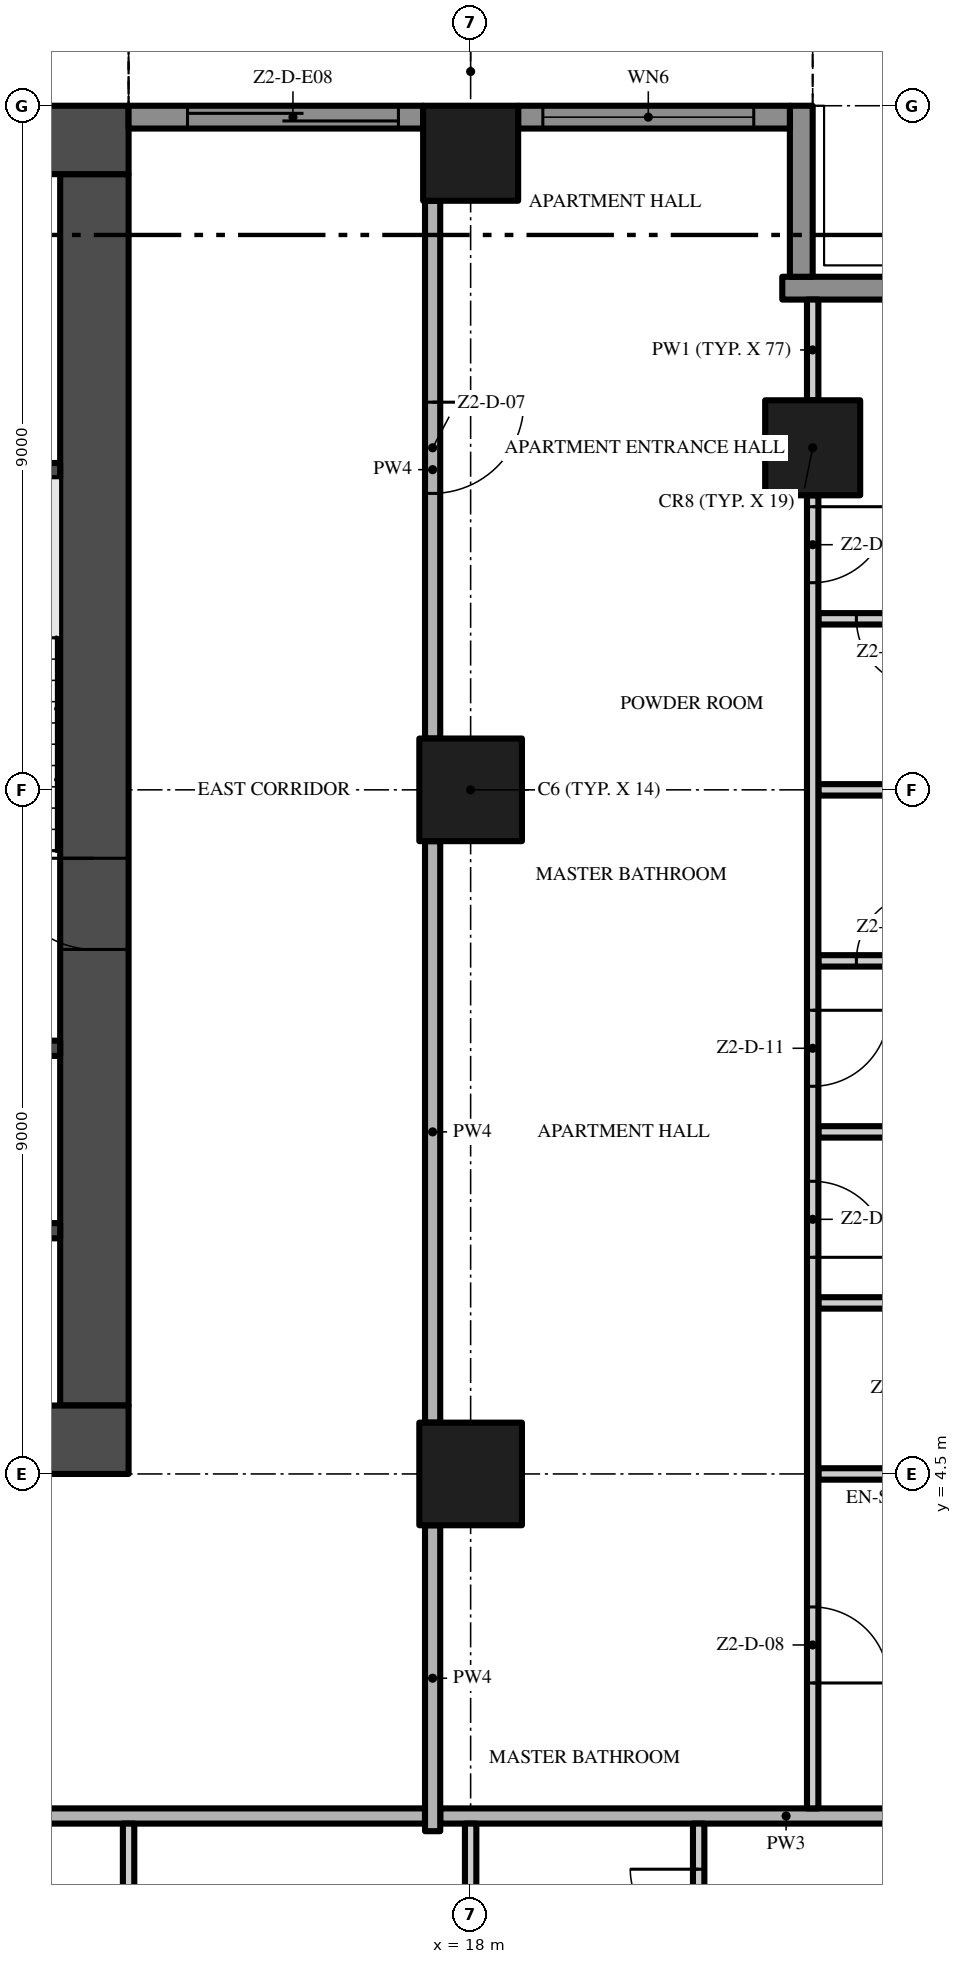
"""IFC4 building model, lengths in metres.
Left out: names, types, materials, properties, quantities, classifications, styles, units other than length and angle.
Written with IfcOpenShell. Run it as: python <this file> out.ifc"""

import sys

from ifc_helpers import new_model, si_unit, direction, frame, frame_2d, origin, origin_2d, place, context, subcontext, project, spatial, rectangle, extrude, element, fill, save


model = new_model("IFC4")
c1 = context("Model", 3, precision=1e-05, world=origin(), true_north=direction((0.0, 1.0)))
c2 = subcontext(c1, "Body", "Model", "MODEL_VIEW")
j1 = project(units=[si_unit("LENGTHUNIT", "METRE"), si_unit("PLANEANGLEUNIT", "RADIAN")], contexts=[c1])
p1 = place(None, origin())
s1 = spatial("IfcSite", under=j1, at=p1, CompositionType="ELEMENT")
p2 = place(p1, origin())
s2 = spatial("IfcBuilding", under=s1, at=p2, CompositionType="ELEMENT")
p3 = place(p2, frame((0.0, 0.0, 103.6)))
s3 = spatial("IfcBuildingStorey", under=s2, at=p3, CompositionType="ELEMENT", Elevation=103.6)
p4 = place(p3, frame((-13.5, 4.95, -0.3), z_axis=(0.0, 0.0, 1.0), x_axis=(1.0, 0.0, 0.0)))
e1 = element("IfcWall", 1, at=p4, inside=s3, PredefinedType="SHEAR", context=c2, shape_type="SweptSolid", body=[
    extrude(rectangle(XDim=27.0, YDim=0.9, at=frame_2d((13.5, 0.0))), origin(), (0.0, 0.0, 1.0), 3.8),
])
p5 = place(p4, frame((12.0, 0.0, 0.3)))
e2 = element("IfcOpeningElement", 2, at=p5, cuts=e1, PredefinedType="OPENING", context=c2, shape_type="SweptSolid", body=[
    extrude(rectangle(XDim=3.0, YDim=2.4, at=frame_2d((1.5, 1.2))), frame((0.0, 0.46, 0.0), z_axis=(0.0, -1.0, 0.0), x_axis=(1.0, 0.0, 0.0)), (0.0, 0.0, 1.0), 0.92),
])
p6 = place(p4, frame((4.9, 0.0, 0.3)))
e3 = element("IfcOpeningElement", 3, at=p6, cuts=e1, PredefinedType="OPENING", context=c2, shape_type="SweptSolid", body=[
    extrude(rectangle(XDim=1.2, YDim=2.2, at=frame_2d((0.6, 1.1))), frame((0.0, 0.46, 0.0), z_axis=(0.0, -1.0, 0.0), x_axis=(1.0, 0.0, 0.0)), (0.0, 0.0, 1.0), 0.92),
])
p7 = place(p4, frame((20.75, 0.0, 0.3)))
e4 = element("IfcOpeningElement", 4, at=p7, cuts=e1, PredefinedType="OPENING", context=c2, shape_type="SweptSolid", body=[
    extrude(rectangle(XDim=1.5, YDim=2.2, at=frame_2d((0.75, 1.1))), frame((0.0, 0.46, 0.0), z_axis=(0.0, -1.0, 0.0), x_axis=(1.0, 0.0, 0.0)), (0.0, 0.0, 1.0), 0.92),
])
p8 = place(p4, frame((17.4, 0.0, 0.3)))
e5 = element("IfcOpeningElement", 5, at=p8, cuts=e1, PredefinedType="OPENING", context=c2, shape_type="SweptSolid", body=[
    extrude(rectangle(XDim=1.2, YDim=2.2, at=frame_2d((0.6, 1.1))), frame((0.0, 0.46, 0.0), z_axis=(0.0, -1.0, 0.0), x_axis=(1.0, 0.0, 0.0)), (0.0, 0.0, 1.0), 0.92),
])
p9 = place(p3, frame((13.05, 5.4, -0.3), z_axis=(0.0, 0.0, 1.0), x_axis=(0.0, 1.0, 0.0)))
e6 = element("IfcWall", 6, at=p9, inside=s3, PredefinedType="SHEAR", context=c2, shape_type="SweptSolid", body=[
    extrude(rectangle(XDim=16.2, YDim=0.9, at=frame_2d((8.1, 0.0))), origin(), (0.0, 0.0, 1.0), 3.8),
])
p10 = place(p9, frame((6.0, 0.0, 0.3)))
e7 = element("IfcOpeningElement", 7, at=p10, cuts=e6, PredefinedType="OPENING", context=c2, shape_type="SweptSolid", body=[
    extrude(rectangle(XDim=1.2, YDim=2.2, at=frame_2d((0.6, 1.1))), frame((0.0, 0.46, 0.0), z_axis=(0.0, -1.0, 0.0), x_axis=(1.0, 0.0, 0.0)), (0.0, 0.0, 1.0), 0.92),
])
p11 = place(p3, frame((13.5, 22.05, -0.3), z_axis=(0.0, 0.0, 1.0), x_axis=(-1.0, 0.0, 0.0)))
e8 = element("IfcWall", 8, at=p11, inside=s3, PredefinedType="SHEAR", context=c2, shape_type="SweptSolid", body=[
    extrude(rectangle(XDim=27.0, YDim=0.9, at=frame_2d((13.5, 0.0))), origin(), (0.0, 0.0, 1.0), 3.8),
])
p12 = place(p3, frame((18.0, 13.5, 0.0), z_axis=(0.0, 0.0, 1.0), x_axis=(1.0, 0.0, 0.0)))
e9 = element("IfcColumn", 9, at=p12, inside=s3, PredefinedType="COLUMN", context=c2, shape_type="SweptSolid", body=[
    extrude(rectangle(XDim=1.35, YDim=1.35, at=origin_2d()), origin(), (0.0, 0.0, 1.0), 3.5),
])
p13 = place(p3, frame((18.0, 21.875, 0.0), z_axis=(0.0, 0.0, 1.0), x_axis=(1.0, 0.0, 0.0)))
e10 = element("IfcColumn", 10, at=p13, inside=s3, PredefinedType="COLUMN", context=c2, shape_type="SweptSolid", body=[
    extrude(rectangle(XDim=1.25, YDim=1.25, at=origin_2d()), origin(), (0.0, 0.0, 1.0), 3.5),
])
p14 = place(p3, frame((18.0, 4.5, 0.0), z_axis=(0.0, 0.0, 1.0), x_axis=(1.0, 0.0, 0.0)))
e11 = element("IfcColumn", 11, at=p14, inside=s3, PredefinedType="COLUMN", context=c2, shape_type="SweptSolid", body=[
    extrude(rectangle(XDim=1.35, YDim=1.35, at=origin_2d()), origin(), (0.0, 0.0, 1.0), 3.5),
])
p15 = place(p3, frame((22.5, 18.0, 0.0), z_axis=(0.0, 0.0, 1.0), x_axis=(1.0, 0.0, 0.0)))
e12 = element("IfcColumn", 12, at=p15, inside=s3, PredefinedType="COLUMN", context=c2, shape_type="SweptSolid", body=[
    extrude(rectangle(XDim=1.25, YDim=1.25, at=origin_2d()), origin(), (0.0, 0.0, 1.0), 3.5),
])
p16 = place(p3, frame((22.1, 20.1, 0.0), z_axis=(0.0, 0.0, 1.0), x_axis=(1.0, 0.0, 0.0)))
e13 = element("IfcWall", 13, at=p16, inside=s3, PredefinedType="SOLIDWALL", context=c2, shape_type="SweptSolid", body=[
    extrude(rectangle(XDim=2.35, YDim=0.3, at=frame_2d((1.175, 0.0))), origin(), (0.0, 0.0, 1.0), 3.5),
])
p17 = place(p3, frame((22.35, 22.5, 0.0), z_axis=(0.0, 0.0, 1.0), x_axis=(0.0, -1.0, 0.0)))
e14 = element("IfcWall", 14, at=p17, inside=s3, PredefinedType="SOLIDWALL", context=c2, shape_type="SweptSolid", body=[
    extrude(rectangle(XDim=2.25, YDim=0.3, at=frame_2d((1.125, 0.0))), origin(), (0.0, 0.0, 1.0), 3.5),
])
p18 = place(p3, frame((18.625, 22.35, 0.0), z_axis=(0.0, 0.0, 1.0), x_axis=(1.0, 0.0, 0.0)))
e15 = element("IfcWall", 15, at=p18, inside=s3, PredefinedType="SOLIDWALL", context=c2, shape_type="SweptSolid", body=[
    extrude(rectangle(XDim=3.575, YDim=0.3, at=frame_2d((1.788, 0.0))), origin(), (0.0, 0.0, 1.0), 3.5),
])
p19 = place(p18, frame((0.325, 0.0, 0.45)))
e16 = element("IfcOpeningElement", 16, at=p19, cuts=e15, PredefinedType="OPENING", context=c2, shape_type="SweptSolid", body=[
    extrude(rectangle(XDim=2.775, YDim=2.65, at=frame_2d((1.387, 1.325))), frame((0.0, 0.16, 0.0), z_axis=(0.0, -1.0, 0.0), x_axis=(1.0, 0.0, 0.0)), (0.0, 0.0, 1.0), 0.32),
])
p20 = place(p3, frame((13.5, 22.35, 0.0), z_axis=(0.0, 0.0, 1.0), x_axis=(1.0, 0.0, 0.0)))
e17 = element("IfcWall", 17, at=p20, inside=s3, PredefinedType="SOLIDWALL", context=c2, shape_type="SweptSolid", body=[
    extrude(rectangle(XDim=3.875, YDim=0.3, at=frame_2d((1.938, 0.0))), origin(), (0.0, 0.0, 1.0), 3.5),
])
p21 = place(p20, frame((0.775, 0.0, 0.0)))
e18 = element("IfcOpeningElement", 18, at=p21, cuts=e17, PredefinedType="OPENING", context=c2, shape_type="SweptSolid", body=[
    extrude(rectangle(XDim=2.775, YDim=2.4, at=frame_2d((1.387, 1.2))), frame((0.0, 0.16, 0.0), z_axis=(0.0, -1.0, 0.0), x_axis=(1.0, 0.0, 0.0)), (0.0, 0.0, 1.0), 0.32),
])
for number, where, z_axis, x_axis in (
    (19, (9.65, 7.7, 0.0), (0.0, 0.0, 1.0), (1.0, 0.0, 0.0)),
    (20, (9.65, 10.1, 0.0), (0.0, 0.0, 1.0), (1.0, 0.0, 0.0)),
    (21, (9.65, 17.7, 0.0), (0.0, 0.0, 1.0), (1.0, 0.0, 0.0)),
):
    element("IfcWall", number, at=place(p3, frame(where, z_axis=z_axis, x_axis=x_axis)), inside=s3, PredefinedType="SHEAR", context=c2, shape_type="SweptSolid", body=[
        extrude(rectangle(XDim=2.95, YDim=0.2, at=frame_2d((1.475, 0.0))), origin(), (0.0, 0.0, 1.0), 3.5),
    ])
p22 = place(p3, frame((4.6, 0.0, 0.0), z_axis=(0.0, 0.0, 1.0), x_axis=(1.0, 0.0, 0.0)))
e22 = element("IfcWall", 22, at=p22, inside=s3, PredefinedType="PARTITIONING", context=c2, shape_type="SweptSolid", body=[
    extrude(rectangle(XDim=12.8, YDim=0.2, at=frame_2d((6.4, 0.0))), origin(), (0.0, 0.0, 1.0), 3.5),
])
p23 = place(p3, frame((17.6, 0.0, 0.0), z_axis=(0.0, 0.0, 1.0), x_axis=(1.0, 0.0, 0.0)))
e23 = element("IfcWall", 23, at=p23, inside=s3, PredefinedType="PARTITIONING", context=c2, shape_type="SweptSolid", body=[
    extrude(rectangle(XDim=9.1, YDim=0.2, at=frame_2d((4.55, 0.0))), origin(), (0.0, 0.0, 1.0), 3.5),
])
p24 = place(p3, frame((22.575, 4.5, 0.0), z_axis=(0.0, 0.0, 1.0), x_axis=(1.0, 0.0, 0.0)))
e24 = element("IfcWall", 24, at=p24, inside=s3, PredefinedType="PARTITIONING", context=c2, shape_type="SweptSolid", body=[
    extrude(rectangle(XDim=3.175, YDim=0.15, at=frame_2d((1.587, 0.0))), origin(), (0.0, 0.0, 1.0), 3.5),
])
p25 = place(p3, frame((22.575, 6.75, 0.0), z_axis=(0.0, 0.0, 1.0), x_axis=(1.0, 0.0, 0.0)))
e25 = element("IfcWall", 25, at=p25, inside=s3, PredefinedType="PARTITIONING", context=c2, shape_type="SweptSolid", body=[
    extrude(rectangle(XDim=1.875, YDim=0.15, at=frame_2d((0.938, 0.0))), origin(), (0.0, 0.0, 1.0), 3.5),
])
p26 = place(p3, frame((22.575, 9.0, 0.0), z_axis=(0.0, 0.0, 1.0), x_axis=(1.0, 0.0, 0.0)))
e26 = element("IfcWall", 26, at=p26, inside=s3, PredefinedType="PARTITIONING", context=c2, shape_type="SweptSolid", body=[
    extrude(rectangle(XDim=4.125, YDim=0.15, at=frame_2d((2.062, 0.0))), origin(), (0.0, 0.0, 1.0), 3.5),
])
p27 = place(p3, frame((22.575, 11.25, 0.0), z_axis=(0.0, 0.0, 1.0), x_axis=(1.0, 0.0, 0.0)))
e27 = element("IfcWall", 27, at=p27, inside=s3, PredefinedType="PARTITIONING", context=c2, shape_type="SweptSolid", body=[
    extrude(rectangle(XDim=1.875, YDim=0.15, at=frame_2d((0.938, 0.0))), origin(), (0.0, 0.0, 1.0), 3.5),
])
p28 = place(p27, frame((0.5, 0.0, 0.0)))
e28 = element("IfcOpeningElement", 28, at=p28, cuts=e27, PredefinedType="OPENING", context=c2, shape_type="SweptSolid", body=[
    extrude(rectangle(XDim=0.9, YDim=2.1, at=frame_2d((0.45, 1.05))), frame((0.0, 0.085, 0.0), z_axis=(0.0, -1.0, 0.0), x_axis=(1.0, 0.0, 0.0)), (0.0, 0.0, 1.0), 0.17),
])
p29 = place(p3, frame((22.575, 13.5, 0.0), z_axis=(0.0, 0.0, 1.0), x_axis=(1.0, 0.0, 0.0)))
e29 = element("IfcWall", 29, at=p29, inside=s3, PredefinedType="PARTITIONING", context=c2, shape_type="SweptSolid", body=[
    extrude(rectangle(XDim=1.875, YDim=0.15, at=frame_2d((0.938, 0.0))), origin(), (0.0, 0.0, 1.0), 3.5),
])
p30 = place(p3, frame((24.45, 15.75, 0.0), z_axis=(0.0, 0.0, 1.0), x_axis=(-1.0, 0.0, 0.0)))
e30 = element("IfcWall", 30, at=p30, inside=s3, PredefinedType="PARTITIONING", context=c2, shape_type="SweptSolid", body=[
    extrude(rectangle(XDim=1.875, YDim=0.15, at=frame_2d((0.938, 0.0))), origin(), (0.0, 0.0, 1.0), 3.5),
])
p31 = place(p30, frame((0.475, 0.0, 0.0)))
e31 = element("IfcOpeningElement", 31, at=p31, cuts=e30, PredefinedType="OPENING", context=c2, shape_type="SweptSolid", body=[
    extrude(rectangle(XDim=0.9, YDim=2.1, at=frame_2d((0.45, 1.05))), frame((0.0, 0.085, 0.0), z_axis=(0.0, -1.0, 0.0), x_axis=(1.0, 0.0, 0.0)), (0.0, 0.0, 1.0), 0.17),
])
p32 = place(p3, frame((13.5, -10.275, 0.0), z_axis=(0.0, 0.0, 1.0), x_axis=(0.0, 1.0, 0.0)))
e32 = element("IfcWall", 32, at=p32, inside=s3, PredefinedType="PARTITIONING", context=c2, shape_type="SweptSolid", body=[
    extrude(rectangle(XDim=10.175, YDim=0.15, at=frame_2d((5.088, 0.0))), origin(), (0.0, 0.0, 1.0), 3.5),
])
p33 = place(p3, frame((17.5, -0.2, 0.0), z_axis=(0.0, 0.0, 1.0), x_axis=(0.0, 1.0, 0.0)))
e33 = element("IfcWall", 33, at=p33, inside=s3, PredefinedType="PARTITIONING", context=c2, shape_type="SweptSolid", body=[
    extrude(rectangle(XDim=4.025, YDim=0.2, at=frame_2d((2.013, 0.0))), origin(), (0.0, 0.0, 1.0), 3.5),
])
p34 = place(p3, frame((17.5, 5.175, 0.0), z_axis=(0.0, 0.0, 1.0), x_axis=(0.0, 1.0, 0.0)))
e34 = element("IfcWall", 34, at=p34, inside=s3, PredefinedType="PARTITIONING", context=c2, shape_type="SweptSolid", body=[
    extrude(rectangle(XDim=7.65, YDim=0.2, at=frame_2d((3.825, 0.0))), origin(), (0.0, 0.0, 1.0), 3.5),
])
p35 = place(p3, frame((17.5, 21.25, 0.0), z_axis=(0.0, 0.0, 1.0), x_axis=(0.0, -1.0, 0.0)))
e35 = element("IfcWall", 35, at=p35, inside=s3, PredefinedType="PARTITIONING", context=c2, shape_type="SweptSolid", body=[
    extrude(rectangle(XDim=7.075, YDim=0.2, at=frame_2d((3.538, 0.0))), origin(), (0.0, 0.0, 1.0), 3.5),
])
p36 = place(p35, frame((2.65, 0.0, 0.0)))
e36 = element("IfcOpeningElement", 36, at=p36, cuts=e35, PredefinedType="OPENING", context=c2, shape_type="SweptSolid", body=[
    extrude(rectangle(XDim=1.2, YDim=2.4, at=frame_2d((0.6, 1.2))), frame((0.0, 0.11, 0.0), z_axis=(0.0, -1.0, 0.0), x_axis=(1.0, 0.0, 0.0)), (0.0, 0.0, 1.0), 0.22),
])
p37 = place(p3, frame((18.0, -0.1, 0.0), z_axis=(0.0, 0.0, 1.0), x_axis=(0.0, -1.0, 0.0)))
e37 = element("IfcWall", 37, at=p37, inside=s3, PredefinedType="PARTITIONING", context=c2, shape_type="SweptSolid", body=[
    extrude(rectangle(XDim=3.725, YDim=0.15, at=frame_2d((1.863, 0.0))), origin(), (0.0, 0.0, 1.0), 3.5),
])
p38 = place(p37, frame((2.575, 0.0, 0.0)))
e38 = element("IfcOpeningElement", 38, at=p38, cuts=e37, PredefinedType="OPENING", context=c2, shape_type="SweptSolid", body=[
    extrude(rectangle(XDim=1.0, YDim=2.4, at=frame_2d((0.5, 1.2))), frame((0.0, 0.085, 0.0), z_axis=(0.0, -1.0, 0.0), x_axis=(1.0, 0.0, 0.0)), (0.0, 0.0, 1.0), 0.17),
])
p39 = place(p3, frame((21.0, -2.325, 0.0), z_axis=(0.0, 0.0, 1.0), x_axis=(0.0, 1.0, 0.0)))
e39 = element("IfcWall", 39, at=p39, inside=s3, PredefinedType="PARTITIONING", context=c2, shape_type="SweptSolid", body=[
    extrude(rectangle(XDim=2.225, YDim=0.15, at=frame_2d((1.113, 0.0))), origin(), (0.0, 0.0, 1.0), 3.5),
])
p40 = place(p39, frame((0.725, 0.0, 0.0)))
e40 = element("IfcOpeningElement", 40, at=p40, cuts=e39, PredefinedType="OPENING", context=c2, shape_type="SweptSolid", body=[
    extrude(rectangle(XDim=0.9, YDim=2.1, at=frame_2d((0.45, 1.05))), frame((0.0, 0.085, 0.0), z_axis=(0.0, -1.0, 0.0), x_axis=(1.0, 0.0, 0.0)), (0.0, 0.0, 1.0), 0.17),
])
p41 = place(p3, frame((22.5, 17.375, 0.0), z_axis=(0.0, 0.0, 1.0), x_axis=(0.0, -1.0, 0.0)))
e41 = element("IfcWall", 41, at=p41, inside=s3, PredefinedType="PARTITIONING", context=c2, shape_type="SweptSolid", body=[
    extrude(rectangle(XDim=17.275, YDim=0.15, at=frame_2d((8.637, 0.0))), origin(), (0.0, 0.0, 1.0), 3.5),
])
p42 = place(p41, frame((14.625, 0.0, 0.0)))
e42 = element("IfcOpeningElement", 42, at=p42, cuts=e41, PredefinedType="OPENING", context=c2, shape_type="SweptSolid", body=[
    extrude(rectangle(XDim=1.0, YDim=2.4, at=frame_2d((0.5, 1.2))), frame((0.0, 0.085, 0.0), z_axis=(0.0, -1.0, 0.0), x_axis=(1.0, 0.0, 0.0)), (0.0, 0.0, 1.0), 0.17),
])
p43 = place(p41, frame((9.025, 0.0, 0.0)))
e43 = element("IfcOpeningElement", 43, at=p43, cuts=e41, PredefinedType="OPENING", context=c2, shape_type="SweptSolid", body=[
    extrude(rectangle(XDim=1.0, YDim=2.4, at=frame_2d((0.5, 1.2))), frame((0.0, 0.085, 0.0), z_axis=(0.0, -1.0, 0.0), x_axis=(1.0, 0.0, 0.0)), (0.0, 0.0, 1.0), 0.17),
])
p44 = place(p41, frame((6.775, 0.0, 0.0)))
e44 = element("IfcOpeningElement", 44, at=p44, cuts=e41, PredefinedType="OPENING", context=c2, shape_type="SweptSolid", body=[
    extrude(rectangle(XDim=1.0, YDim=2.4, at=frame_2d((0.5, 1.2))), frame((0.0, 0.085, 0.0), z_axis=(0.0, -1.0, 0.0), x_axis=(1.0, 0.0, 0.0)), (0.0, 0.0, 1.0), 0.17),
])
p45 = place(p41, frame((0.15, 0.0, 0.0)))
e45 = element("IfcOpeningElement", 45, at=p45, cuts=e41, PredefinedType="OPENING", context=c2, shape_type="SweptSolid", body=[
    extrude(rectangle(XDim=1.0, YDim=2.4, at=frame_2d((0.5, 1.2))), frame((0.0, 0.085, 0.0), z_axis=(0.0, -1.0, 0.0), x_axis=(1.0, 0.0, 0.0)), (0.0, 0.0, 1.0), 0.17),
])
p46 = place(p3, frame((22.5, 18.625, 0.0), z_axis=(0.0, 0.0, 1.0), x_axis=(0.0, 1.0, 0.0)))
e46 = element("IfcWall", 46, at=p46, inside=s3, PredefinedType="PARTITIONING", context=c2, shape_type="SweptSolid", body=[
    extrude(rectangle(XDim=1.325, YDim=0.15, at=frame_2d((0.662, 0.0))), origin(), (0.0, 0.0, 1.0), 3.5),
])
p47 = place(p19, origin())
e47 = element("IfcWindow", 47, at=p47, inside=s3, PartitioningType="SINGLE_PANEL", PredefinedType="WINDOW", context=c2, shape_type="SweptSolid", body=[
    extrude(rectangle(XDim=2.775, YDim=2.65, at=frame_2d((1.387, 1.325))), frame((0.0, 0.03, 0.0), z_axis=(0.0, -1.0, 0.0), x_axis=(1.0, 0.0, 0.0)), (0.0, 0.0, 1.0), 0.06),
])
fill(e16, e47)
p48 = place(p21, origin())
e48 = element("IfcDoor", 48, at=p48, inside=s3, OperationType="SINGLE_SWING_LEFT", PredefinedType="DOOR", context=c2, shape_type="SweptSolid", body=[
    extrude(rectangle(XDim=2.775, YDim=2.4, at=frame_2d((1.387, 1.2))), frame((0.0, 0.025, 0.0), z_axis=(0.0, -1.0, 0.0), x_axis=(1.0, 0.0, 0.0)), (0.0, 0.0, 1.0), 0.05),
])
fill(e18, e48)
p49 = place(p10, frame((1.2, 0.0, 0.0), z_axis=(0.0, 0.0, 1.0), x_axis=(-1.0, 0.0, 0.0)))
e49 = element("IfcDoor", 49, at=p49, inside=s3, OperationType="SINGLE_SWING_LEFT", PredefinedType="DOOR", context=c2, shape_type="SweptSolid", body=[
    extrude(rectangle(XDim=1.2, YDim=2.2, at=frame_2d((0.6, 1.1))), frame((0.0, 0.025, 0.0), z_axis=(0.0, -1.0, 0.0), x_axis=(1.0, 0.0, 0.0)), (0.0, 0.0, 1.0), 0.05),
])
fill(e7, e49)
p50 = place(p36, origin())
e50 = element("IfcDoor", 50, at=p50, inside=s3, OperationType="SINGLE_SWING_LEFT", PredefinedType="DOOR", context=c2, shape_type="SweptSolid", body=[
    extrude(rectangle(XDim=1.2, YDim=2.4, at=frame_2d((0.6, 1.2))), frame((0.0, 0.025, 0.0), z_axis=(0.0, -1.0, 0.0), x_axis=(1.0, 0.0, 0.0)), (0.0, 0.0, 1.0), 0.05),
])
fill(e36, e50)
p51 = place(p42, origin())
e51 = element("IfcDoor", 51, at=p51, inside=s3, OperationType="SINGLE_SWING_RIGHT", PredefinedType="DOOR", context=c2, shape_type="SweptSolid", body=[
    extrude(rectangle(XDim=1.0, YDim=2.4, at=frame_2d((0.5, 1.2))), frame((0.0, 0.025, 0.0), z_axis=(0.0, -1.0, 0.0), x_axis=(1.0, 0.0, 0.0)), (0.0, 0.0, 1.0), 0.05),
])
fill(e42, e51)
p52 = place(p43, origin())
e52 = element("IfcDoor", 52, at=p52, inside=s3, OperationType="SINGLE_SWING_RIGHT", PredefinedType="DOOR", context=c2, shape_type="SweptSolid", body=[
    extrude(rectangle(XDim=1.0, YDim=2.4, at=frame_2d((0.5, 1.2))), frame((0.0, 0.025, 0.0), z_axis=(0.0, -1.0, 0.0), x_axis=(1.0, 0.0, 0.0)), (0.0, 0.0, 1.0), 0.05),
])
fill(e43, e52)
p53 = place(p44, origin())
e53 = element("IfcDoor", 53, at=p53, inside=s3, OperationType="SINGLE_SWING_LEFT", PredefinedType="DOOR", context=c2, shape_type="SweptSolid", body=[
    extrude(rectangle(XDim=1.0, YDim=2.4, at=frame_2d((0.5, 1.2))), frame((0.0, 0.025, 0.0), z_axis=(0.0, -1.0, 0.0), x_axis=(1.0, 0.0, 0.0)), (0.0, 0.0, 1.0), 0.05),
])
fill(e44, e53)
p54 = place(p28, origin())
e54 = element("IfcDoor", 54, at=p54, inside=s3, OperationType="SINGLE_SWING_RIGHT", PredefinedType="DOOR", context=c2, shape_type="SweptSolid", body=[
    extrude(rectangle(XDim=0.9, YDim=2.1, at=frame_2d((0.45, 1.05))), frame((0.0, 0.025, 0.0), z_axis=(0.0, -1.0, 0.0), x_axis=(1.0, 0.0, 0.0)), (0.0, 0.0, 1.0), 0.05),
])
fill(e28, e54)
p55 = place(p45, origin())
e55 = element("IfcDoor", 55, at=p55, inside=s3, OperationType="SINGLE_SWING_LEFT", PredefinedType="DOOR", context=c2, shape_type="SweptSolid", body=[
    extrude(rectangle(XDim=1.0, YDim=2.4, at=frame_2d((0.5, 1.2))), frame((0.0, 0.025, 0.0), z_axis=(0.0, -1.0, 0.0), x_axis=(1.0, 0.0, 0.0)), (0.0, 0.0, 1.0), 0.05),
])
fill(e45, e55)
p56 = place(p31, origin())
e56 = element("IfcDoor", 56, at=p56, inside=s3, OperationType="SINGLE_SWING_LEFT", PredefinedType="DOOR", context=c2, shape_type="SweptSolid", body=[
    extrude(rectangle(XDim=0.9, YDim=2.1, at=frame_2d((0.45, 1.05))), frame((0.0, 0.025, 0.0), z_axis=(0.0, -1.0, 0.0), x_axis=(1.0, 0.0, 0.0)), (0.0, 0.0, 1.0), 0.05),
])
fill(e31, e56)
p57 = place(p40, origin())
e57 = element("IfcDoor", 57, at=p57, inside=s3, OperationType="SINGLE_SWING_RIGHT", PredefinedType="DOOR", context=c2, shape_type="SweptSolid", body=[
    extrude(rectangle(XDim=0.9, YDim=2.1, at=frame_2d((0.45, 1.05))), frame((0.0, 0.025, 0.0), z_axis=(0.0, -1.0, 0.0), x_axis=(1.0, 0.0, 0.0)), (0.0, 0.0, 1.0), 0.05),
])
fill(e40, e57)
save(model, sys.argv[1])
